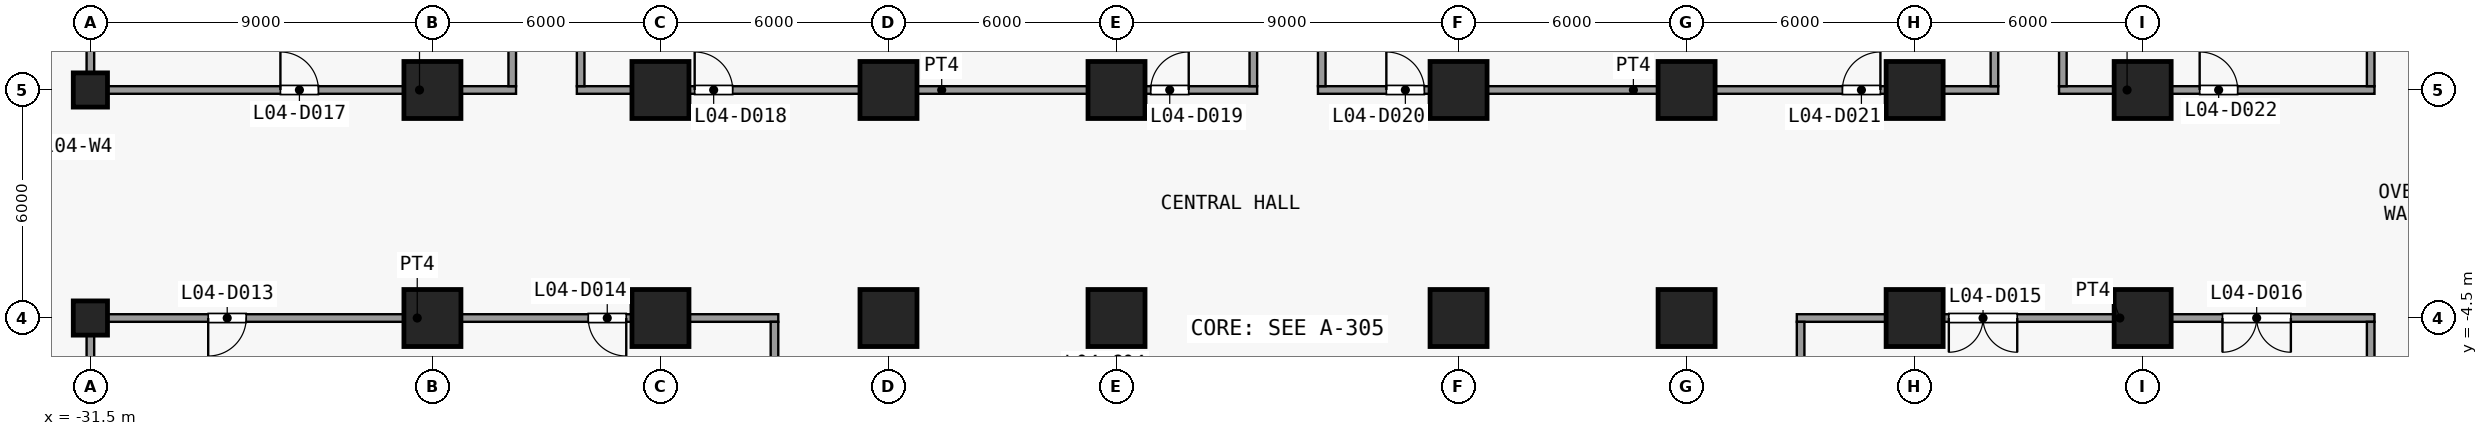
"""IFC4 building model, lengths in metres.
Left out: names, types, materials, properties, quantities, classifications, styles, units other than length and angle.
Written with IfcOpenShell. Run it as: python <this file> out.ifc"""

import sys

from ifc_helpers import new_model, si_unit, direction, frame, frame_2d, origin, origin_2d, place, context, subcontext, project, spatial, rectangle, extrude, element, fill, save


model = new_model("IFC4")
c1 = context("Model", 3, precision=1e-05, world=origin(), true_north=direction((0.0, 1.0)))
c2 = subcontext(c1, "Body", "Model", "MODEL_VIEW")
j1 = project(units=[si_unit("LENGTHUNIT", "METRE"), si_unit("PLANEANGLEUNIT", "RADIAN")], contexts=[c1])
p1 = place(None, origin())
s1 = spatial("IfcSite", under=j1, at=p1, CompositionType="ELEMENT")
p2 = place(p1, origin())
s2 = spatial("IfcBuilding", under=s1, at=p2, CompositionType="ELEMENT")
p3 = place(p2, frame((0.0, 0.0, 23.5)))
s3 = spatial("IfcBuildingStorey", under=s2, at=p3, CompositionType="ELEMENT", Elevation=23.5)
for number, where, z_axis, x_axis in (
    (1, (-31.5, -4.5, 0.0), (0.0, 0.0, 1.0), (1.0, 0.0, 0.0)),
    (2, (-31.5, 1.5, 0.0), (0.0, 0.0, 1.0), (1.0, 0.0, 0.0)),
):
    element("IfcColumn", number, at=place(p3, frame(where, z_axis=z_axis, x_axis=x_axis)), inside=s3, PredefinedType="COLUMN", context=c2, shape_type="SweptSolid", body=[
        extrude(rectangle(XDim=0.9, YDim=0.9, at=origin_2d()), origin(), (0.0, 0.0, 1.0), 4.5),
    ])
for number, where, z_axis, x_axis in (
    (3, (-22.5, -4.5, 0.0), (0.0, 0.0, 1.0), (1.0, 0.0, 0.0)),
    (4, (-22.5, 1.5, 0.0), (0.0, 0.0, 1.0), (1.0, 0.0, 0.0)),
    (5, (-16.5, -4.5, 0.0), (0.0, 0.0, 1.0), (1.0, 0.0, 0.0)),
    (6, (-16.5, 1.5, 0.0), (0.0, 0.0, 1.0), (1.0, 0.0, 0.0)),
    (7, (-10.5, -4.5, 0.0), (0.0, 0.0, 1.0), (1.0, 0.0, 0.0)),
    (8, (-10.5, 1.5, 0.0), (0.0, 0.0, 1.0), (1.0, 0.0, 0.0)),
    (9, (-4.5, -4.5, 0.0), (0.0, 0.0, 1.0), (1.0, 0.0, 0.0)),
    (10, (-4.5, 1.5, 0.0), (0.0, 0.0, 1.0), (1.0, 0.0, 0.0)),
    (11, (4.5, -4.5, 0.0), (0.0, 0.0, 1.0), (1.0, 0.0, 0.0)),
    (12, (4.5, 1.5, 0.0), (0.0, 0.0, 1.0), (1.0, 0.0, 0.0)),
    (13, (10.5, -4.5, 0.0), (0.0, 0.0, 1.0), (1.0, 0.0, 0.0)),
    (14, (10.5, 1.5, 0.0), (0.0, 0.0, 1.0), (1.0, 0.0, 0.0)),
    (15, (16.5, -4.5, 0.0), (0.0, 0.0, 1.0), (1.0, 0.0, 0.0)),
    (16, (16.5, 1.5, 0.0), (0.0, 0.0, 1.0), (1.0, 0.0, 0.0)),
    (17, (22.5, -4.5, 0.0), (0.0, 0.0, 1.0), (1.0, 0.0, 0.0)),
    (18, (22.5, 1.5, 0.0), (0.0, 0.0, 1.0), (1.0, 0.0, 0.0)),
):
    element("IfcColumn", number, at=place(p3, frame(where, z_axis=z_axis, x_axis=x_axis)), inside=s3, PredefinedType="COLUMN", context=c2, shape_type="SweptSolid", body=[
        extrude(rectangle(XDim=1.5, YDim=1.5, at=origin_2d()), origin(), (0.0, 0.0, 1.0), 4.5),
    ])
p4 = place(p3, frame((-31.6, -4.5, 0.0), z_axis=(0.0, 0.0, 1.0), x_axis=(1.0, 0.0, 0.0)))
e19 = element("IfcWall", 19, at=p4, inside=s3, PredefinedType="PARTITIONING", context=c2, shape_type="SweptSolid", body=[
    extrude(rectangle(XDim=18.2, YDim=0.2, at=frame_2d((9.1, 0.0))), origin(), (0.0, 0.0, 1.0), 4.15),
])
p5 = place(p4, frame((3.2, 0.0, 0.0)))
e20 = element("IfcOpeningElement", 20, at=p5, cuts=e19, PredefinedType="OPENING", context=c2, shape_type="SweptSolid", body=[
    extrude(rectangle(XDim=1.0, YDim=2.1, at=frame_2d((0.5, 1.05))), frame((0.0, 0.11, 0.0), z_axis=(0.0, -1.0, 0.0), x_axis=(1.0, 0.0, 0.0)), (0.0, 0.0, 1.0), 0.22),
])
p6 = place(p4, frame((13.2, 0.0, 0.0)))
e21 = element("IfcOpeningElement", 21, at=p6, cuts=e19, PredefinedType="OPENING", context=c2, shape_type="SweptSolid", body=[
    extrude(rectangle(XDim=1.0, YDim=2.1, at=frame_2d((0.5, 1.05))), frame((0.0, 0.11, 0.0), z_axis=(0.0, -1.0, 0.0), x_axis=(1.0, 0.0, 0.0)), (0.0, 0.0, 1.0), 0.22),
])
p7 = place(p3, frame((13.4, -4.5, 0.0), z_axis=(0.0, 0.0, 1.0), x_axis=(1.0, 0.0, 0.0)))
e22 = element("IfcWall", 22, at=p7, inside=s3, PredefinedType="PARTITIONING", context=c2, shape_type="SweptSolid", body=[
    extrude(rectangle(XDim=15.2, YDim=0.2, at=frame_2d((7.6, 0.0))), origin(), (0.0, 0.0, 1.0), 4.15),
])
p8 = place(p7, frame((4.0, 0.0, 0.0)))
e23 = element("IfcOpeningElement", 23, at=p8, cuts=e22, PredefinedType="OPENING", context=c2, shape_type="SweptSolid", body=[
    extrude(rectangle(XDim=1.8, YDim=2.1, at=frame_2d((0.9, 1.05))), frame((0.0, 0.11, 0.0), z_axis=(0.0, -1.0, 0.0), x_axis=(1.0, 0.0, 0.0)), (0.0, 0.0, 1.0), 0.22),
])
p9 = place(p7, frame((11.2, 0.0, 0.0)))
e24 = element("IfcOpeningElement", 24, at=p9, cuts=e22, PredefinedType="OPENING", context=c2, shape_type="SweptSolid", body=[
    extrude(rectangle(XDim=1.8, YDim=2.1, at=frame_2d((0.9, 1.05))), frame((0.0, 0.11, 0.0), z_axis=(0.0, -1.0, 0.0), x_axis=(1.0, 0.0, 0.0)), (0.0, 0.0, 1.0), 0.22),
])
p10 = place(p3, frame((-31.6, 1.5, 0.0), z_axis=(0.0, 0.0, 1.0), x_axis=(1.0, 0.0, 0.0)))
e25 = element("IfcWall", 25, at=p10, inside=s3, PredefinedType="PARTITIONING", context=c2, shape_type="SweptSolid", body=[
    extrude(rectangle(XDim=11.3, YDim=0.2, at=frame_2d((5.65, 0.0))), origin(), (0.0, 0.0, 1.0), 4.15),
])
p11 = place(p10, frame((5.1, 0.0, 0.0)))
e26 = element("IfcOpeningElement", 26, at=p11, cuts=e25, PredefinedType="OPENING", context=c2, shape_type="SweptSolid", body=[
    extrude(rectangle(XDim=1.0, YDim=2.1, at=frame_2d((0.5, 1.05))), frame((0.0, 0.11, 0.0), z_axis=(0.0, -1.0, 0.0), x_axis=(1.0, 0.0, 0.0)), (0.0, 0.0, 1.0), 0.22),
])
p12 = place(p3, frame((-18.7, 1.5, 0.0), z_axis=(0.0, 0.0, 1.0), x_axis=(1.0, 0.0, 0.0)))
e27 = element("IfcWall", 27, at=p12, inside=s3, PredefinedType="PARTITIONING", context=c2, shape_type="SweptSolid", body=[
    extrude(rectangle(XDim=17.9, YDim=0.2, at=frame_2d((8.95, 0.0))), origin(), (0.0, 0.0, 1.0), 4.15),
])
p13 = place(p12, frame((3.1, 0.0, 0.0)))
e28 = element("IfcOpeningElement", 28, at=p13, cuts=e27, PredefinedType="OPENING", context=c2, shape_type="SweptSolid", body=[
    extrude(rectangle(XDim=1.0, YDim=2.1, at=frame_2d((0.5, 1.05))), frame((0.0, 0.11, 0.0), z_axis=(0.0, -1.0, 0.0), x_axis=(1.0, 0.0, 0.0)), (0.0, 0.0, 1.0), 0.22),
])
p14 = place(p12, frame((15.1, 0.0, 0.0)))
e29 = element("IfcOpeningElement", 29, at=p14, cuts=e27, PredefinedType="OPENING", context=c2, shape_type="SweptSolid", body=[
    extrude(rectangle(XDim=1.0, YDim=2.1, at=frame_2d((0.5, 1.05))), frame((0.0, 0.11, 0.0), z_axis=(0.0, -1.0, 0.0), x_axis=(1.0, 0.0, 0.0)), (0.0, 0.0, 1.0), 0.22),
])
p15 = place(p3, frame((0.8, 1.5, 0.0), z_axis=(0.0, 0.0, 1.0), x_axis=(1.0, 0.0, 0.0)))
e30 = element("IfcWall", 30, at=p15, inside=s3, PredefinedType="PARTITIONING", context=c2, shape_type="SweptSolid", body=[
    extrude(rectangle(XDim=17.9, YDim=0.2, at=frame_2d((8.95, 0.0))), origin(), (0.0, 0.0, 1.0), 4.15),
])
p16 = place(p15, frame((1.8, 0.0, 0.0)))
e31 = element("IfcOpeningElement", 31, at=p16, cuts=e30, PredefinedType="OPENING", context=c2, shape_type="SweptSolid", body=[
    extrude(rectangle(XDim=1.0, YDim=2.1, at=frame_2d((0.5, 1.05))), frame((0.0, 0.11, 0.0), z_axis=(0.0, -1.0, 0.0), x_axis=(1.0, 0.0, 0.0)), (0.0, 0.0, 1.0), 0.22),
])
p17 = place(p15, frame((13.8, 0.0, 0.0)))
e32 = element("IfcOpeningElement", 32, at=p17, cuts=e30, PredefinedType="OPENING", context=c2, shape_type="SweptSolid", body=[
    extrude(rectangle(XDim=1.0, YDim=2.1, at=frame_2d((0.5, 1.05))), frame((0.0, 0.11, 0.0), z_axis=(0.0, -1.0, 0.0), x_axis=(1.0, 0.0, 0.0)), (0.0, 0.0, 1.0), 0.22),
])
p18 = place(p3, frame((20.3, 1.5, 0.0), z_axis=(0.0, 0.0, 1.0), x_axis=(1.0, 0.0, 0.0)))
e33 = element("IfcWall", 33, at=p18, inside=s3, PredefinedType="PARTITIONING", context=c2, shape_type="SweptSolid", body=[
    extrude(rectangle(XDim=8.3, YDim=0.2, at=frame_2d((4.15, 0.0))), origin(), (0.0, 0.0, 1.0), 4.15),
])
p19 = place(p18, frame((3.7, 0.0, 0.0)))
e34 = element("IfcOpeningElement", 34, at=p19, cuts=e33, PredefinedType="OPENING", context=c2, shape_type="SweptSolid", body=[
    extrude(rectangle(XDim=1.0, YDim=2.1, at=frame_2d((0.5, 1.05))), frame((0.0, 0.11, 0.0), z_axis=(0.0, -1.0, 0.0), x_axis=(1.0, 0.0, 0.0)), (0.0, 0.0, 1.0), 0.22),
])
p20 = place(p3, frame((-31.5, -19.4, 0.0), z_axis=(0.0, 0.0, 1.0), x_axis=(0.0, 1.0, 0.0)))
e35 = element("IfcWall", 35, at=p20, inside=s3, PredefinedType="PARTITIONING", context=c2, shape_type="SweptSolid", body=[
    extrude(rectangle(XDim=14.8, YDim=0.2, at=frame_2d((7.4, 0.0))), origin(), (0.0, 0.0, 1.0), 4.15),
])
for number, where, z_axis, x_axis in (
    (36, (-31.5, 1.6, 0.0), (0.0, 0.0, 1.0), (0.0, 1.0, 0.0)),
    (37, (-20.4, 1.6, 0.0), (0.0, 0.0, 1.0), (0.0, 1.0, 0.0)),
    (38, (-18.6, 1.6, 0.0), (0.0, 0.0, 1.0), (0.0, 1.0, 0.0)),
):
    element("IfcWall", number, at=place(p3, frame(where, z_axis=z_axis, x_axis=x_axis)), inside=s3, PredefinedType="PARTITIONING", context=c2, shape_type="SweptSolid", body=[
        extrude(rectangle(XDim=11.8, YDim=0.2, at=frame_2d((5.9, 0.0))), origin(), (0.0, 0.0, 1.0), 4.15),
    ])
p21 = place(p3, frame((-13.5, -7.9, 0.0), z_axis=(0.0, 0.0, 1.0), x_axis=(0.0, 1.0, 0.0)))
e39 = element("IfcWall", 39, at=p21, inside=s3, PredefinedType="PARTITIONING", context=c2, shape_type="SweptSolid", body=[
    extrude(rectangle(XDim=3.3, YDim=0.2, at=frame_2d((1.65, 0.0))), origin(), (0.0, 0.0, 1.0), 4.15),
])
for number, where, z_axis, x_axis in (
    (40, (-0.9, 1.6, 0.0), (0.0, 0.0, 1.0), (0.0, 1.0, 0.0)),
    (41, (0.9, 1.6, 0.0), (0.0, 0.0, 1.0), (0.0, 1.0, 0.0)),
):
    element("IfcWall", number, at=place(p3, frame(where, z_axis=z_axis, x_axis=x_axis)), inside=s3, PredefinedType="PARTITIONING", context=c2, shape_type="SweptSolid", body=[
        extrude(rectangle(XDim=11.8, YDim=0.2, at=frame_2d((5.9, 0.0))), origin(), (0.0, 0.0, 1.0), 4.15),
    ])
p22 = place(p3, frame((13.5, -7.9, 0.0), z_axis=(0.0, 0.0, 1.0), x_axis=(0.0, 1.0, 0.0)))
e42 = element("IfcWall", 42, at=p22, inside=s3, PredefinedType="PARTITIONING", context=c2, shape_type="SweptSolid", body=[
    extrude(rectangle(XDim=3.3, YDim=0.2, at=frame_2d((1.65, 0.0))), origin(), (0.0, 0.0, 1.0), 4.15),
])
for number, where, z_axis, x_axis in (
    (43, (18.6, 1.6, 0.0), (0.0, 0.0, 1.0), (0.0, 1.0, 0.0)),
    (44, (20.4, 1.6, 0.0), (0.0, 0.0, 1.0), (0.0, 1.0, 0.0)),
):
    element("IfcWall", number, at=place(p3, frame(where, z_axis=z_axis, x_axis=x_axis)), inside=s3, PredefinedType="PARTITIONING", context=c2, shape_type="SweptSolid", body=[
        extrude(rectangle(XDim=11.8, YDim=0.2, at=frame_2d((5.9, 0.0))), origin(), (0.0, 0.0, 1.0), 4.15),
    ])
p23 = place(p3, frame((28.5, -19.4, 0.0), z_axis=(0.0, 0.0, 1.0), x_axis=(0.0, 1.0, 0.0)))
e45 = element("IfcWall", 45, at=p23, inside=s3, PredefinedType="PARTITIONING", context=c2, shape_type="SweptSolid", body=[
    extrude(rectangle(XDim=14.8, YDim=0.2, at=frame_2d((7.4, 0.0))), origin(), (0.0, 0.0, 1.0), 4.15),
])
p24 = place(p3, frame((28.5, 1.6, 0.0), z_axis=(0.0, 0.0, 1.0), x_axis=(0.0, 1.0, 0.0)))
e46 = element("IfcWall", 46, at=p24, inside=s3, PredefinedType="PARTITIONING", context=c2, shape_type="SweptSolid", body=[
    extrude(rectangle(XDim=11.8, YDim=0.2, at=frame_2d((5.9, 0.0))), origin(), (0.0, 0.0, 1.0), 4.15),
])
p25 = place(p5, origin())
e47 = element("IfcDoor", 47, at=p25, inside=s3, OperationType="SINGLE_SWING_LEFT", PredefinedType="DOOR", context=c2, shape_type="SweptSolid", body=[
    extrude(rectangle(XDim=1.0, YDim=2.1, at=frame_2d((0.5, 1.05))), frame((0.0, 0.025, 0.0), z_axis=(0.0, -1.0, 0.0), x_axis=(1.0, 0.0, 0.0)), (0.0, 0.0, 1.0), 0.05),
])
fill(e20, e47)
p26 = place(p6, origin())
e48 = element("IfcDoor", 48, at=p26, inside=s3, OperationType="SINGLE_SWING_RIGHT", PredefinedType="DOOR", context=c2, shape_type="SweptSolid", body=[
    extrude(rectangle(XDim=1.0, YDim=2.1, at=frame_2d((0.5, 1.05))), frame((0.0, 0.025, 0.0), z_axis=(0.0, -1.0, 0.0), x_axis=(1.0, 0.0, 0.0)), (0.0, 0.0, 1.0), 0.05),
])
fill(e21, e48)
p27 = place(p8, origin())
e49 = element("IfcDoor", 49, at=p27, inside=s3, OperationType="DOUBLE_DOOR_SINGLE_SWING", PredefinedType="DOOR", context=c2, shape_type="SweptSolid", body=[
    extrude(rectangle(XDim=1.8, YDim=2.1, at=frame_2d((0.9, 1.05))), frame((0.0, 0.025, 0.0), z_axis=(0.0, -1.0, 0.0), x_axis=(1.0, 0.0, 0.0)), (0.0, 0.0, 1.0), 0.05),
])
fill(e23, e49)
p28 = place(p9, origin())
e50 = element("IfcDoor", 50, at=p28, inside=s3, OperationType="DOUBLE_DOOR_SINGLE_SWING", PredefinedType="DOOR", context=c2, shape_type="SweptSolid", body=[
    extrude(rectangle(XDim=1.8, YDim=2.1, at=frame_2d((0.9, 1.05))), frame((0.0, 0.025, 0.0), z_axis=(0.0, -1.0, 0.0), x_axis=(1.0, 0.0, 0.0)), (0.0, 0.0, 1.0), 0.05),
])
fill(e24, e50)
p29 = place(p11, origin())
e51 = element("IfcDoor", 51, at=p29, inside=s3, OperationType="SINGLE_SWING_RIGHT", PredefinedType="DOOR", context=c2, shape_type="SweptSolid", body=[
    extrude(rectangle(XDim=1.0, YDim=2.1, at=frame_2d((0.5, 1.05))), frame((0.0, 0.025, 0.0), z_axis=(0.0, -1.0, 0.0), x_axis=(1.0, 0.0, 0.0)), (0.0, 0.0, 1.0), 0.05),
])
fill(e26, e51)
p30 = place(p13, origin())
e52 = element("IfcDoor", 52, at=p30, inside=s3, OperationType="SINGLE_SWING_RIGHT", PredefinedType="DOOR", context=c2, shape_type="SweptSolid", body=[
    extrude(rectangle(XDim=1.0, YDim=2.1, at=frame_2d((0.5, 1.05))), frame((0.0, 0.025, 0.0), z_axis=(0.0, -1.0, 0.0), x_axis=(1.0, 0.0, 0.0)), (0.0, 0.0, 1.0), 0.05),
])
fill(e28, e52)
p31 = place(p14, origin())
e53 = element("IfcDoor", 53, at=p31, inside=s3, OperationType="SINGLE_SWING_LEFT", PredefinedType="DOOR", context=c2, shape_type="SweptSolid", body=[
    extrude(rectangle(XDim=1.0, YDim=2.1, at=frame_2d((0.5, 1.05))), frame((0.0, 0.025, 0.0), z_axis=(0.0, -1.0, 0.0), x_axis=(1.0, 0.0, 0.0)), (0.0, 0.0, 1.0), 0.05),
])
fill(e29, e53)
p32 = place(p16, origin())
e54 = element("IfcDoor", 54, at=p32, inside=s3, OperationType="SINGLE_SWING_RIGHT", PredefinedType="DOOR", context=c2, shape_type="SweptSolid", body=[
    extrude(rectangle(XDim=1.0, YDim=2.1, at=frame_2d((0.5, 1.05))), frame((0.0, 0.025, 0.0), z_axis=(0.0, -1.0, 0.0), x_axis=(1.0, 0.0, 0.0)), (0.0, 0.0, 1.0), 0.05),
])
fill(e31, e54)
p33 = place(p17, origin())
e55 = element("IfcDoor", 55, at=p33, inside=s3, OperationType="SINGLE_SWING_LEFT", PredefinedType="DOOR", context=c2, shape_type="SweptSolid", body=[
    extrude(rectangle(XDim=1.0, YDim=2.1, at=frame_2d((0.5, 1.05))), frame((0.0, 0.025, 0.0), z_axis=(0.0, -1.0, 0.0), x_axis=(1.0, 0.0, 0.0)), (0.0, 0.0, 1.0), 0.05),
])
fill(e32, e55)
p34 = place(p19, origin())
e56 = element("IfcDoor", 56, at=p34, inside=s3, OperationType="SINGLE_SWING_RIGHT", PredefinedType="DOOR", context=c2, shape_type="SweptSolid", body=[
    extrude(rectangle(XDim=1.0, YDim=2.1, at=frame_2d((0.5, 1.05))), frame((0.0, 0.025, 0.0), z_axis=(0.0, -1.0, 0.0), x_axis=(1.0, 0.0, 0.0)), (0.0, 0.0, 1.0), 0.05),
])
fill(e34, e56)
save(model, sys.argv[1])
